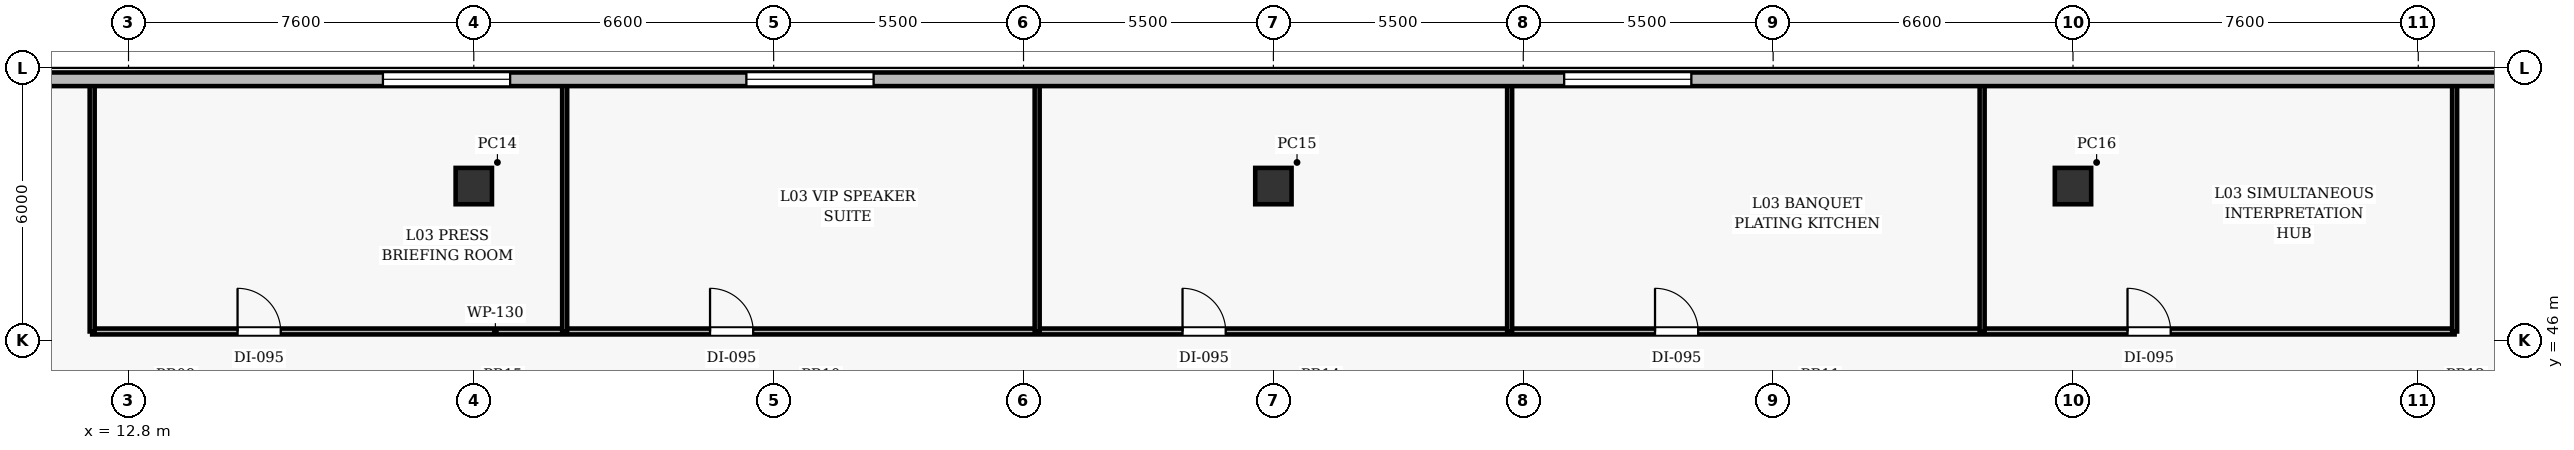
"""IFC4 building model, lengths in metres.
Left out: names, types, materials, properties, quantities, classifications, styles, units other than length and angle.
Written with IfcOpenShell. Run it as: python <this file> out.ifc"""

import sys

from ifc_helpers import new_model, si_unit, direction, frame, frame_2d, origin, origin_2d, place, context, subcontext, project, spatial, rectangle, extrude, element, fill, save


model = new_model("IFC4")
c1 = context("Model", 3, precision=1e-05, world=origin(), true_north=direction((0.0, 1.0)))
c2 = subcontext(c1, "Body", "Model", "MODEL_VIEW")
j1 = project(units=[si_unit("LENGTHUNIT", "METRE"), si_unit("PLANEANGLEUNIT", "RADIAN")], contexts=[c1])
p1 = place(None, origin())
s1 = spatial("IfcSite", under=j1, at=p1, CompositionType="ELEMENT")
p2 = place(p1, origin())
s2 = spatial("IfcBuilding", under=s1, at=p2, CompositionType="ELEMENT")
p3 = place(p2, frame((0.0, 0.0, 18.6)))
s3 = spatial("IfcBuildingStorey", under=s2, at=p3, CompositionType="ELEMENT", Elevation=18.6)
for number, where, z_axis, x_axis in (
    (1, (20.4, 49.4, 0.0), (0.0, 0.0, 1.0), (1.0, 0.0, 0.0)),
    (2, (38.0, 49.4, 0.0), (0.0, 0.0, 1.0), (1.0, 0.0, 0.0)),
    (3, (55.6, 49.4, 0.0), (0.0, 0.0, 1.0), (1.0, 0.0, 0.0)),
):
    element("IfcColumn", number, at=place(p3, frame(where, z_axis=z_axis, x_axis=x_axis)), inside=s3, PredefinedType="COLUMN", context=c2, shape_type="SweptSolid", body=[
        extrude(rectangle(XDim=0.8, YDim=0.8, at=origin_2d()), origin(), (0.0, 0.0, 1.0), 5.4),
    ])
p4 = place(p3, frame((12.0, 46.2, 0.0), z_axis=(0.0, 0.0, 1.0), x_axis=(1.0, 0.0, 0.0)))
e4 = element("IfcWall", 4, at=p4, inside=s3, PredefinedType="PARTITIONING", context=c2, shape_type="SweptSolid", body=[
    extrude(rectangle(XDim=52.0, YDim=0.13, at=frame_2d((26.0, 0.0))), origin(), (0.0, 0.0, 1.0), 4.11),
])
p5 = place(p4, frame((3.2, 0.0, 0.0)))
e5 = element("IfcOpeningElement", 5, at=p5, cuts=e4, PredefinedType="OPENING", context=c2, shape_type="SweptSolid", body=[
    extrude(rectangle(XDim=0.95, YDim=2.15, at=frame_2d((0.475, 1.075))), frame((0.0, 0.075, 0.0), z_axis=(0.0, -1.0, 0.0), x_axis=(1.0, 0.0, 0.0)), (0.0, 0.0, 1.0), 0.15),
])
p6 = place(p4, frame((13.6, 0.0, 0.0)))
e6 = element("IfcOpeningElement", 6, at=p6, cuts=e4, PredefinedType="OPENING", context=c2, shape_type="SweptSolid", body=[
    extrude(rectangle(XDim=0.95, YDim=2.15, at=frame_2d((0.475, 1.075))), frame((0.0, 0.075, 0.0), z_axis=(0.0, -1.0, 0.0), x_axis=(1.0, 0.0, 0.0)), (0.0, 0.0, 1.0), 0.15),
])
p7 = place(p4, frame((24.0, 0.0, 0.0)))
e7 = element("IfcOpeningElement", 7, at=p7, cuts=e4, PredefinedType="OPENING", context=c2, shape_type="SweptSolid", body=[
    extrude(rectangle(XDim=0.95, YDim=2.15, at=frame_2d((0.475, 1.075))), frame((0.0, 0.075, 0.0), z_axis=(0.0, -1.0, 0.0), x_axis=(1.0, 0.0, 0.0)), (0.0, 0.0, 1.0), 0.15),
])
p8 = place(p4, frame((34.4, 0.0, 0.0)))
e8 = element("IfcOpeningElement", 8, at=p8, cuts=e4, PredefinedType="OPENING", context=c2, shape_type="SweptSolid", body=[
    extrude(rectangle(XDim=0.95, YDim=2.15, at=frame_2d((0.475, 1.075))), frame((0.0, 0.075, 0.0), z_axis=(0.0, -1.0, 0.0), x_axis=(1.0, 0.0, 0.0)), (0.0, 0.0, 1.0), 0.15),
])
p9 = place(p4, frame((44.8, 0.0, 0.0)))
e9 = element("IfcOpeningElement", 9, at=p9, cuts=e4, PredefinedType="OPENING", context=c2, shape_type="SweptSolid", body=[
    extrude(rectangle(XDim=0.95, YDim=2.15, at=frame_2d((0.475, 1.075))), frame((0.0, 0.075, 0.0), z_axis=(0.0, -1.0, 0.0), x_axis=(1.0, 0.0, 0.0)), (0.0, 0.0, 1.0), 0.15),
])
for number, where, z_axis, x_axis in (
    (10, (12.0, 46.2, 0.0), (0.0, 0.0, 1.0), (0.0, 1.0, 0.0)),
    (11, (22.4, 46.2, 0.0), (0.0, 0.0, 1.0), (0.0, 1.0, 0.0)),
    (12, (32.8, 46.2, 0.0), (0.0, 0.0, 1.0), (0.0, 1.0, 0.0)),
    (13, (43.2, 46.2, 0.0), (0.0, 0.0, 1.0), (0.0, 1.0, 0.0)),
    (14, (53.6, 46.2, 0.0), (0.0, 0.0, 1.0), (0.0, 1.0, 0.0)),
    (15, (64.0, 46.2, 0.0), (0.0, 0.0, 1.0), (0.0, 1.0, 0.0)),
):
    element("IfcWall", number, at=place(p3, frame(where, z_axis=z_axis, x_axis=x_axis)), inside=s3, PredefinedType="PARTITIONING", context=c2, shape_type="SweptSolid", body=[
        extrude(rectangle(XDim=5.66, YDim=0.11, at=frame_2d((2.83, 0.0))), origin(), (0.0, 0.0, 1.0), 4.11),
    ])
p10 = place(p3, frame((0.4, 51.75, 0.0), z_axis=(0.0, 0.0, 1.0), x_axis=(1.0, 0.0, 0.0)))
e16 = element("IfcWall", 16, at=p10, inside=s3, PredefinedType="SOLIDWALL", context=c2, shape_type="SweptSolid", body=[
    extrude(rectangle(XDim=75.2, YDim=0.3, at=frame_2d((37.6, 0.0))), origin(), (0.0, 0.0, 1.0), 4.56),
])
p11 = place(p10, frame((18.0, 0.0, 0.95)))
e17 = element("IfcOpeningElement", 17, at=p11, cuts=e16, PredefinedType="OPENING", context=c2, shape_type="SweptSolid", body=[
    extrude(rectangle(XDim=2.8, YDim=2.4, at=frame_2d((1.4, 1.2))), frame((0.0, 0.16, 0.0), z_axis=(0.0, -1.0, 0.0), x_axis=(1.0, 0.0, 0.0)), (0.0, 0.0, 1.0), 0.32),
])
p12 = place(p10, frame((26.0, 0.0, 0.95)))
e18 = element("IfcOpeningElement", 18, at=p12, cuts=e16, PredefinedType="OPENING", context=c2, shape_type="SweptSolid", body=[
    extrude(rectangle(XDim=2.8, YDim=2.4, at=frame_2d((1.4, 1.2))), frame((0.0, 0.16, 0.0), z_axis=(0.0, -1.0, 0.0), x_axis=(1.0, 0.0, 0.0)), (0.0, 0.0, 1.0), 0.32),
])
p13 = place(p10, frame((44.0, 0.0, 0.95)))
e19 = element("IfcOpeningElement", 19, at=p13, cuts=e16, PredefinedType="OPENING", context=c2, shape_type="SweptSolid", body=[
    extrude(rectangle(XDim=2.8, YDim=2.4, at=frame_2d((1.4, 1.2))), frame((0.0, 0.16, 0.0), z_axis=(0.0, -1.0, 0.0), x_axis=(1.0, 0.0, 0.0)), (0.0, 0.0, 1.0), 0.32),
])
p14 = place(p5, origin())
e20 = element("IfcDoor", 20, at=p14, inside=s3, OperationType="SINGLE_SWING_LEFT", PredefinedType="DOOR", context=c2, shape_type="SweptSolid", body=[
    extrude(rectangle(XDim=0.95, YDim=2.15, at=frame_2d((0.475, 1.075))), frame((0.0, 0.025, 0.0), z_axis=(0.0, -1.0, 0.0), x_axis=(1.0, 0.0, 0.0)), (0.0, 0.0, 1.0), 0.05),
])
fill(e5, e20)
p15 = place(p6, origin())
e21 = element("IfcDoor", 21, at=p15, inside=s3, OperationType="SINGLE_SWING_LEFT", PredefinedType="DOOR", context=c2, shape_type="SweptSolid", body=[
    extrude(rectangle(XDim=0.95, YDim=2.15, at=frame_2d((0.475, 1.075))), frame((0.0, 0.025, 0.0), z_axis=(0.0, -1.0, 0.0), x_axis=(1.0, 0.0, 0.0)), (0.0, 0.0, 1.0), 0.05),
])
fill(e6, e21)
p16 = place(p7, origin())
e22 = element("IfcDoor", 22, at=p16, inside=s3, OperationType="SINGLE_SWING_LEFT", PredefinedType="DOOR", context=c2, shape_type="SweptSolid", body=[
    extrude(rectangle(XDim=0.95, YDim=2.15, at=frame_2d((0.475, 1.075))), frame((0.0, 0.025, 0.0), z_axis=(0.0, -1.0, 0.0), x_axis=(1.0, 0.0, 0.0)), (0.0, 0.0, 1.0), 0.05),
])
fill(e7, e22)
p17 = place(p8, origin())
e23 = element("IfcDoor", 23, at=p17, inside=s3, OperationType="SINGLE_SWING_LEFT", PredefinedType="DOOR", context=c2, shape_type="SweptSolid", body=[
    extrude(rectangle(XDim=0.95, YDim=2.15, at=frame_2d((0.475, 1.075))), frame((0.0, 0.025, 0.0), z_axis=(0.0, -1.0, 0.0), x_axis=(1.0, 0.0, 0.0)), (0.0, 0.0, 1.0), 0.05),
])
fill(e8, e23)
p18 = place(p9, origin())
e24 = element("IfcDoor", 24, at=p18, inside=s3, OperationType="SINGLE_SWING_LEFT", PredefinedType="DOOR", context=c2, shape_type="SweptSolid", body=[
    extrude(rectangle(XDim=0.95, YDim=2.15, at=frame_2d((0.475, 1.075))), frame((0.0, 0.025, 0.0), z_axis=(0.0, -1.0, 0.0), x_axis=(1.0, 0.0, 0.0)), (0.0, 0.0, 1.0), 0.05),
])
fill(e9, e24)
p19 = place(p11, origin())
e25 = element("IfcWindow", 25, at=p19, inside=s3, PartitioningType="SINGLE_PANEL", PredefinedType="WINDOW", context=c2, shape_type="SweptSolid", body=[
    extrude(rectangle(XDim=2.8, YDim=2.4, at=frame_2d((1.4, 1.2))), frame((0.0, 0.03, 0.0), z_axis=(0.0, -1.0, 0.0), x_axis=(1.0, 0.0, 0.0)), (0.0, 0.0, 1.0), 0.06),
])
fill(e17, e25)
p20 = place(p12, origin())
e26 = element("IfcWindow", 26, at=p20, inside=s3, PartitioningType="SINGLE_PANEL", PredefinedType="WINDOW", context=c2, shape_type="SweptSolid", body=[
    extrude(rectangle(XDim=2.8, YDim=2.4, at=frame_2d((1.4, 1.2))), frame((0.0, 0.03, 0.0), z_axis=(0.0, -1.0, 0.0), x_axis=(1.0, 0.0, 0.0)), (0.0, 0.0, 1.0), 0.06),
])
fill(e18, e26)
p21 = place(p13, origin())
e27 = element("IfcWindow", 27, at=p21, inside=s3, PartitioningType="SINGLE_PANEL", PredefinedType="WINDOW", context=c2, shape_type="SweptSolid", body=[
    extrude(rectangle(XDim=2.8, YDim=2.4, at=frame_2d((1.4, 1.2))), frame((0.0, 0.03, 0.0), z_axis=(0.0, -1.0, 0.0), x_axis=(1.0, 0.0, 0.0)), (0.0, 0.0, 1.0), 0.06),
])
fill(e19, e27)
save(model, sys.argv[1])
